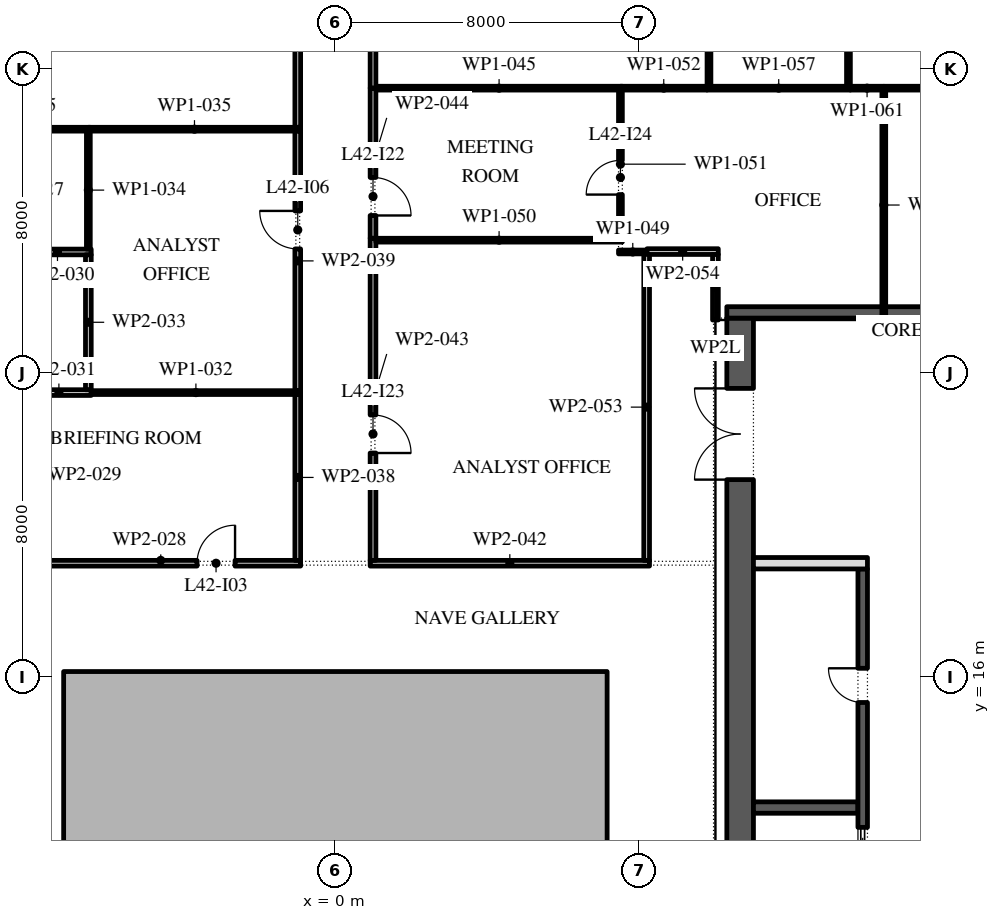
"""IFC4 building model, lengths in metres.
Left out: names, types, materials, properties, quantities, classifications, styles, units other than length and angle.
Written with IfcOpenShell. Run it as: python <this file> out.ifc"""

import sys

from ifc_helpers import new_model, si_unit, direction, frame, frame_2d, origin, place, context, subcontext, project, spatial, polyline, rectangle, outline, extrude, element, fill, save


model = new_model("IFC4")
c1 = context("Model", 3, precision=1e-05, world=origin(), true_north=direction((0.0, 1.0)))
c2 = subcontext(c1, "Body", "Model", "MODEL_VIEW")
j1 = project(units=[si_unit("LENGTHUNIT", "METRE"), si_unit("PLANEANGLEUNIT", "RADIAN")], contexts=[c1])
p1 = place(None, origin())
s1 = spatial("IfcSite", under=j1, at=p1, CompositionType="ELEMENT")
p2 = place(p1, origin())
s2 = spatial("IfcBuilding", under=s1, at=p2, CompositionType="ELEMENT")
p3 = place(p2, frame((0.0, 0.0, 192.6)))
s3 = spatial("IfcBuildingStorey", under=s2, at=p3, CompositionType="ELEMENT", Elevation=192.6)
p4 = place(p3, origin())
e1 = element("IfcWall", 1, at=p4, inside=s3, PredefinedType="STANDARD", context=c2, shape_type="SweptSolid", body=[
    extrude(outline(polyline([(-7.15, -2.15), (7.15, -2.15), (7.15, 16.15), (-7.15, 16.15), (-7.15, -2.15)]), holes=[polyline([(-7.0, -2.0), (-7.0, 16.0), (7.0, 16.0), (7.0, -2.0), (-7.0, -2.0)])]), origin(), (0.0, 0.0, 1.0), 4.0),
])
p5 = place(p3, frame((10.65, -2.45, 0.0), z_axis=(0.0, 0.0, 1.0), x_axis=(0.0, 1.0, 0.0)))
e2 = element("IfcWall", 2, at=p5, inside=s3, PredefinedType="SHEAR", context=c2, shape_type="SweptSolid", body=[
    extrude(rectangle(XDim=27.9, YDim=0.7, at=frame_2d((13.95, 0.0))), origin(), (0.0, 0.0, 1.0), 4.0),
])
p6 = place(p5, frame((23.65, 0.0, 0.0)))
e3 = element("IfcOpeningElement", 3, at=p6, cuts=e2, PredefinedType="OPENING", context=c2, shape_type="SweptSolid", body=[
    extrude(rectangle(XDim=2.4, YDim=2.1, at=frame_2d((1.2, 1.05))), frame((0.0, 0.36, 0.0), z_axis=(0.0, -1.0, 0.0), x_axis=(1.0, 0.0, 0.0)), (0.0, 0.0, 1.0), 0.72),
])
p7 = place(p5, frame((1.087, 0.0, 0.0)))
e4 = element("IfcOpeningElement", 4, at=p7, cuts=e2, PredefinedType="OPENING", context=c2, shape_type="SweptSolid", body=[
    extrude(rectangle(XDim=0.9, YDim=2.1, at=frame_2d((0.45, 1.05))), frame((0.0, 0.36, 0.0), z_axis=(0.0, -1.0, 0.0), x_axis=(1.0, 0.0, 0.0)), (0.0, 0.0, 1.0), 0.72),
])
p8 = place(p5, frame((4.262, 0.0, 0.0)))
e5 = element("IfcOpeningElement", 5, at=p8, cuts=e2, PredefinedType="OPENING", context=c2, shape_type="SweptSolid", body=[
    extrude(rectangle(XDim=1.0, YDim=2.1, at=frame_2d((0.5, 1.05))), frame((0.0, 0.36, 0.0), z_axis=(0.0, -1.0, 0.0), x_axis=(1.0, 0.0, 0.0)), (0.0, 0.0, 1.0), 0.72),
])
p9 = place(p3, frame((10.3, 25.6, 0.0), z_axis=(0.0, 0.0, 1.0), x_axis=(1.0, 0.0, 0.0)))
e6 = element("IfcWall", 6, at=p9, inside=s3, PredefinedType="SHEAR", context=c2, shape_type="SweptSolid", body=[
    extrude(rectangle(XDim=11.4, YDim=0.3, at=frame_2d((5.7, 0.0))), origin(), (0.0, 0.0, 1.0), 4.0),
])
p10 = place(p3, frame((11.0, 12.571, 0.0), z_axis=(0.0, 0.0, 1.0), x_axis=(1.0, 0.0, 0.0)))
e7 = element("IfcWall", 7, at=p10, inside=s3, PredefinedType="SHEAR", context=c2, shape_type="SweptSolid", body=[
    extrude(rectangle(XDim=2.75, YDim=0.3, at=frame_2d((1.375, 0.0))), origin(), (0.0, 0.0, 1.0), 4.0),
])
p11 = place(p3, frame((13.875, -2.45, 0.0), z_axis=(0.0, 0.0, 1.0), x_axis=(0.0, 1.0, 0.0)))
e8 = element("IfcWall", 8, at=p11, inside=s3, PredefinedType="SHEAR", context=c2, shape_type="SweptSolid", body=[
    extrude(rectangle(XDim=21.3, YDim=0.25, at=frame_2d((10.65, 0.0))), origin(), (0.0, 0.0, 1.0), 4.0),
])
p12 = place(p11, frame((17.786, 0.0, 0.0)))
e9 = element("IfcOpeningElement", 9, at=p12, cuts=e8, PredefinedType="OPENING", context=c2, shape_type="SweptSolid", body=[
    extrude(rectangle(XDim=0.9, YDim=2.1, at=frame_2d((0.45, 1.05))), frame((0.0, 0.135, 0.0), z_axis=(0.0, -1.0, 0.0), x_axis=(1.0, 0.0, 0.0)), (0.0, 0.0, 1.0), 0.27),
])
p13 = place(p11, frame((6.971, 0.0, 0.0)))
e10 = element("IfcOpeningElement", 10, at=p13, cuts=e8, PredefinedType="OPENING", context=c2, shape_type="SweptSolid", body=[
    extrude(rectangle(XDim=1.1, YDim=2.1, at=frame_2d((0.55, 1.05))), frame((0.0, 0.135, 0.0), z_axis=(0.0, -1.0, 0.0), x_axis=(1.0, 0.0, 0.0)), (0.0, 0.0, 1.0), 0.27),
])
p14 = place(p11, frame((9.114, 0.0, 0.0)))
e11 = element("IfcOpeningElement", 11, at=p14, cuts=e8, PredefinedType="OPENING", context=c2, shape_type="SweptSolid", body=[
    extrude(rectangle(XDim=1.1, YDim=2.1, at=frame_2d((0.55, 1.05))), frame((0.0, 0.135, 0.0), z_axis=(0.0, -1.0, 0.0), x_axis=(1.0, 0.0, 0.0)), (0.0, 0.0, 1.0), 0.27),
])
p15 = place(p11, frame((11.257, 0.0, 0.0)))
e12 = element("IfcOpeningElement", 12, at=p15, cuts=e8, PredefinedType="OPENING", context=c2, shape_type="SweptSolid", body=[
    extrude(rectangle(XDim=1.1, YDim=2.1, at=frame_2d((0.55, 1.05))), frame((0.0, 0.135, 0.0), z_axis=(0.0, -1.0, 0.0), x_axis=(1.0, 0.0, 0.0)), (0.0, 0.0, 1.0), 0.27),
])
p16 = place(p11, frame((13.4, 0.0, 0.0)))
e13 = element("IfcOpeningElement", 13, at=p16, cuts=e8, PredefinedType="OPENING", context=c2, shape_type="SweptSolid", body=[
    extrude(rectangle(XDim=1.1, YDim=2.1, at=frame_2d((0.55, 1.05))), frame((0.0, 0.135, 0.0), z_axis=(0.0, -1.0, 0.0), x_axis=(1.0, 0.0, 0.0)), (0.0, 0.0, 1.0), 0.27),
])
p17 = place(p3, frame((11.0, 19.0, 0.0), z_axis=(0.0, 0.0, 1.0), x_axis=(1.0, 0.0, 0.0)))
e14 = element("IfcWall", 14, at=p17, inside=s3, PredefinedType="PARTITIONING", context=c2, shape_type="SweptSolid", body=[
    extrude(rectangle(XDim=3.0, YDim=0.3, at=frame_2d((1.5, 0.0))), origin(), (0.0, 0.0, 1.0), 4.0),
])
p18 = place(p3, frame((-9.78, 30.42, 0.0), z_axis=(0.0, 0.0, 1.0), x_axis=(1.0, 0.0, 0.0)))
e15 = element("IfcWall", 15, at=p18, inside=s3, PredefinedType="PARTITIONING", context=c2, shape_type="SweptSolid", body=[
    extrude(rectangle(XDim=3.33, YDim=0.1, at=frame_2d((1.665, 0.0))), origin(), (0.0, 0.0, 1.0), 4.0),
])
p19 = place(p18, frame((1.15, 0.0, 0.0)))
e16 = element("IfcOpeningElement", 16, at=p19, cuts=e15, PredefinedType="OPENING", context=c2, shape_type="SweptSolid", body=[
    extrude(rectangle(XDim=0.9, YDim=2.1, at=frame_2d((0.45, 1.05))), frame((0.0, 0.06, 0.0), z_axis=(0.0, -1.0, 0.0), x_axis=(1.0, 0.0, 0.0)), (0.0, 0.0, 1.0), 0.12),
])
p20 = place(p3, frame((-8.275, 19.0, 0.0), z_axis=(0.0, 0.0, 1.0), x_axis=(1.0, 0.0, 0.0)))
e17 = element("IfcWall", 17, at=p20, inside=s3, PredefinedType="PARTITIONING", context=c2, shape_type="SweptSolid", body=[
    extrude(rectangle(XDim=7.36, YDim=0.15, at=frame_2d((3.68, 0.0))), origin(), (0.0, 0.0, 1.0), 4.0),
])
p21 = place(p20, frame((4.635, 0.0, 0.0)))
e18 = element("IfcOpeningElement", 18, at=p21, cuts=e17, PredefinedType="OPENING", context=c2, shape_type="SweptSolid", body=[
    extrude(rectangle(XDim=1.0, YDim=2.1, at=frame_2d((0.5, 1.05))), frame((0.0, 0.085, 0.0), z_axis=(0.0, -1.0, 0.0), x_axis=(1.0, 0.0, 0.0)), (0.0, 0.0, 1.0), 0.17),
])
p22 = place(p3, frame((-8.2, 27.19, 0.0), z_axis=(0.0, 0.0, 1.0), x_axis=(1.0, 0.0, 0.0)))
e19 = element("IfcWall", 19, at=p22, inside=s3, PredefinedType="PARTITIONING", context=c2, shape_type="SweptSolid", body=[
    extrude(rectangle(XDim=1.775, YDim=0.15, at=frame_2d((0.887, 0.0))), origin(), (0.0, 0.0, 1.0), 4.0),
])
p23 = place(p3, frame((-6.425, 23.49, 0.0), z_axis=(0.0, 0.0, 1.0), x_axis=(-1.0, 0.0, 0.0)))
e20 = element("IfcWall", 20, at=p23, inside=s3, PredefinedType="PARTITIONING", context=c2, shape_type="SweptSolid", body=[
    extrude(rectangle(XDim=1.7, YDim=0.15, at=frame_2d((0.85, 0.0))), origin(), (0.0, 0.0, 1.0), 4.0),
])
p24 = place(p3, frame((-6.425, 23.49, 0.0), z_axis=(0.0, 0.0, 1.0), x_axis=(1.0, 0.0, 0.0)))
e21 = element("IfcWall", 21, at=p24, inside=s3, PredefinedType="PARTITIONING", context=c2, shape_type="SweptSolid", body=[
    extrude(rectangle(XDim=5.51, YDim=0.1, at=frame_2d((2.755, 0.0))), origin(), (0.0, 0.0, 1.0), 4.0),
])
p25 = place(p3, frame((-6.5, 27.115, 0.0), z_axis=(0.0, 0.0, 1.0), x_axis=(0.0, -1.0, 0.0)))
e22 = element("IfcWall", 22, at=p25, inside=s3, PredefinedType="PARTITIONING", context=c2, shape_type="SweptSolid", body=[
    extrude(rectangle(XDim=3.55, YDim=0.15, at=frame_2d((1.775, 0.0))), origin(), (0.0, 0.0, 1.0), 4.0),
])
p26 = place(p3, frame((-6.5, 30.37, 0.0), z_axis=(0.0, 0.0, 1.0), x_axis=(0.0, -1.0, 0.0)))
e23 = element("IfcWall", 23, at=p26, inside=s3, PredefinedType="PARTITIONING", context=c2, shape_type="SweptSolid", body=[
    extrude(rectangle(XDim=3.105, YDim=0.1, at=frame_2d((1.553, 0.0))), origin(), (0.0, 0.0, 1.0), 4.0),
])
p27 = place(p3, frame((-6.5, 30.42, 0.0), z_axis=(0.0, 0.0, 1.0), x_axis=(1.0, 0.0, 0.0)))
e24 = element("IfcWall", 24, at=p27, inside=s3, PredefinedType="PARTITIONING", context=c2, shape_type="SweptSolid", body=[
    extrude(rectangle(XDim=5.585, YDim=0.1, at=frame_2d((2.792, 0.0))), origin(), (0.0, 0.0, 1.0), 4.0),
])
p28 = place(p3, frame((-0.99, 19.075, 0.0), z_axis=(0.0, 0.0, 1.0), x_axis=(0.0, 1.0, 0.0)))
e25 = element("IfcWall", 25, at=p28, inside=s3, PredefinedType="PARTITIONING", context=c2, shape_type="SweptSolid", body=[
    extrude(rectangle(XDim=4.365, YDim=0.15, at=frame_2d((2.183, 0.0))), origin(), (0.0, 0.0, 1.0), 4.0),
])
p29 = place(p3, frame((-0.99, 23.54, 0.0), z_axis=(0.0, 0.0, 1.0), x_axis=(0.0, 1.0, 0.0)))
e26 = element("IfcWall", 26, at=p29, inside=s3, PredefinedType="PARTITIONING", context=c2, shape_type="SweptSolid", body=[
    extrude(rectangle(XDim=6.83, YDim=0.15, at=frame_2d((3.415, 0.0))), origin(), (0.0, 0.0, 1.0), 4.0),
])
p30 = place(p29, frame((3.73, 0.0, 0.0)))
e27 = element("IfcOpeningElement", 27, at=p30, cuts=e26, PredefinedType="OPENING", context=c2, shape_type="SweptSolid", body=[
    extrude(rectangle(XDim=1.0, YDim=2.1, at=frame_2d((0.5, 1.05))), frame((0.0, 0.085, 0.0), z_axis=(0.0, -1.0, 0.0), x_axis=(1.0, 0.0, 0.0)), (0.0, 0.0, 1.0), 0.17),
])
p31 = place(p3, frame((-0.99, 30.47, 0.0), z_axis=(0.0, 0.0, 1.0), x_axis=(0.0, 1.0, 0.0)))
e28 = element("IfcWall", 28, at=p31, inside=s3, PredefinedType="PARTITIONING", context=c2, shape_type="SweptSolid", body=[
    extrude(rectangle(XDim=10.826, YDim=0.15, at=frame_2d((5.413, 0.0))), origin(), (0.0, 0.0, 1.0), 4.0),
])
p32 = place(p31, frame((3.9, 0.0, 0.0)))
e29 = element("IfcOpeningElement", 29, at=p32, cuts=e28, PredefinedType="OPENING", context=c2, shape_type="SweptSolid", body=[
    extrude(rectangle(XDim=1.0, YDim=2.1, at=frame_2d((0.5, 1.05))), frame((0.0, 0.085, 0.0), z_axis=(0.0, -1.0, 0.0), x_axis=(1.0, 0.0, 0.0)), (0.0, 0.0, 1.0), 0.17),
])
p33 = place(p3, frame((0.915, 19.0, 0.0), z_axis=(0.0, 0.0, 1.0), x_axis=(1.0, 0.0, 0.0)))
e30 = element("IfcWall", 30, at=p33, inside=s3, PredefinedType="PARTITIONING", context=c2, shape_type="SweptSolid", body=[
    extrude(rectangle(XDim=7.35, YDim=0.15, at=frame_2d((3.675, 0.0))), origin(), (0.0, 0.0, 1.0), 4.0),
])
p34 = place(p3, frame((0.99, 27.55, 0.0), z_axis=(0.0, 0.0, 1.0), x_axis=(0.0, -1.0, 0.0)))
e31 = element("IfcWall", 31, at=p34, inside=s3, PredefinedType="PARTITIONING", context=c2, shape_type="SweptSolid", body=[
    extrude(rectangle(XDim=8.475, YDim=0.15, at=frame_2d((4.238, 0.0))), origin(), (0.0, 0.0, 1.0), 4.0),
])
p35 = place(p34, frame((4.65, 0.0, 0.0)))
e32 = element("IfcOpeningElement", 32, at=p35, cuts=e31, PredefinedType="OPENING", context=c2, shape_type="SweptSolid", body=[
    extrude(rectangle(XDim=1.0, YDim=2.1, at=frame_2d((0.5, 1.05))), frame((0.0, 0.085, 0.0), z_axis=(0.0, -1.0, 0.0), x_axis=(1.0, 0.0, 0.0)), (0.0, 0.0, 1.0), 0.17),
])
p36 = place(p3, frame((0.99, 31.5, 0.0), z_axis=(0.0, 0.0, 1.0), x_axis=(0.0, -1.0, 0.0)))
e33 = element("IfcWall", 33, at=p36, inside=s3, PredefinedType="PARTITIONING", context=c2, shape_type="SweptSolid", body=[
    extrude(rectangle(XDim=3.95, YDim=0.15, at=frame_2d((1.975, 0.0))), origin(), (0.0, 0.0, 1.0), 4.0),
])
p37 = place(p36, frame((2.35, 0.0, 0.0)))
e34 = element("IfcOpeningElement", 34, at=p37, cuts=e33, PredefinedType="OPENING", context=c2, shape_type="SweptSolid", body=[
    extrude(rectangle(XDim=1.0, YDim=2.1, at=frame_2d((0.5, 1.05))), frame((0.0, 0.085, 0.0), z_axis=(0.0, -1.0, 0.0), x_axis=(1.0, 0.0, 0.0)), (0.0, 0.0, 1.0), 0.17),
])
p38 = place(p3, frame((1.065, 31.5, 0.0), z_axis=(0.0, 0.0, 1.0), x_axis=(1.0, 0.0, 0.0)))
e35 = element("IfcWall", 35, at=p38, inside=s3, PredefinedType="PARTITIONING", context=c2, shape_type="SweptSolid", body=[
    extrude(rectangle(XDim=6.485, YDim=0.1, at=frame_2d((3.243, 0.0))), origin(), (0.0, 0.0, 1.0), 4.0),
])
p39 = place(p3, frame((0.99, 40.05, 0.0), z_axis=(0.0, 0.0, 1.0), x_axis=(0.0, -1.0, 0.0)))
e36 = element("IfcWall", 36, at=p39, inside=s3, PredefinedType="PARTITIONING", context=c2, shape_type="SweptSolid", body=[
    extrude(rectangle(XDim=8.55, YDim=0.15, at=frame_2d((4.275, 0.0))), origin(), (0.0, 0.0, 1.0), 4.0),
])
p40 = place(p39, frame((2.9, 0.0, 0.0)))
e37 = element("IfcOpeningElement", 37, at=p40, cuts=e36, PredefinedType="OPENING", context=c2, shape_type="SweptSolid", body=[
    extrude(rectangle(XDim=1.0, YDim=2.1, at=frame_2d((0.5, 1.05))), frame((0.0, 0.085, 0.0), z_axis=(0.0, -1.0, 0.0), x_axis=(1.0, 0.0, 0.0)), (0.0, 0.0, 1.0), 0.17),
])
p41 = place(p3, frame((7.45, 27.19, 0.0), z_axis=(0.0, 0.0, 1.0), x_axis=(1.0, 0.0, 0.0)))
e38 = element("IfcWall", 38, at=p41, inside=s3, PredefinedType="PARTITIONING", context=c2, shape_type="SweptSolid", body=[
    extrude(rectangle(XDim=0.75, YDim=0.1, at=frame_2d((0.375, 0.0))), origin(), (0.0, 0.0, 1.0), 4.0),
])
p42 = place(p3, frame((7.55, 27.5, 0.0), z_axis=(0.0, 0.0, 1.0), x_axis=(-1.0, 0.0, 0.0)))
e39 = element("IfcWall", 39, at=p42, inside=s3, PredefinedType="PARTITIONING", context=c2, shape_type="SweptSolid", body=[
    extrude(rectangle(XDim=6.485, YDim=0.1, at=frame_2d((3.243, 0.0))), origin(), (0.0, 0.0, 1.0), 4.0),
])
p43 = place(p3, frame((7.5, 31.45, 0.0), z_axis=(0.0, 0.0, 1.0), x_axis=(0.0, -1.0, 0.0)))
e40 = element("IfcWall", 40, at=p43, inside=s3, PredefinedType="PARTITIONING", context=c2, shape_type="SweptSolid", body=[
    extrude(rectangle(XDim=3.9, YDim=0.1, at=frame_2d((1.95, 0.0))), origin(), (0.0, 0.0, 1.0), 4.0),
])
p44 = place(p43, frame((1.85, 0.0, 0.0)))
e41 = element("IfcOpeningElement", 41, at=p44, cuts=e40, PredefinedType="OPENING", context=c2, shape_type="SweptSolid", body=[
    extrude(rectangle(XDim=0.9, YDim=2.1, at=frame_2d((0.45, 1.05))), frame((0.0, 0.06, 0.0), z_axis=(0.0, -1.0, 0.0), x_axis=(1.0, 0.0, 0.0)), (0.0, 0.0, 1.0), 0.12),
])
p45 = place(p3, frame((7.5, 31.5, 0.0), z_axis=(0.0, 0.0, 1.0), x_axis=(1.0, 0.0, 0.0)))
e42 = element("IfcWall", 42, at=p45, inside=s3, PredefinedType="PARTITIONING", context=c2, shape_type="SweptSolid", body=[
    extrude(rectangle(XDim=2.28, YDim=0.1, at=frame_2d((1.14, 0.0))), origin(), (0.0, 0.0, 1.0), 4.0),
])
p46 = place(p3, frame((8.19, 19.075, 0.0), z_axis=(0.0, 0.0, 1.0), x_axis=(0.0, 1.0, 0.0)))
e43 = element("IfcWall", 43, at=p46, inside=s3, PredefinedType="PARTITIONING", context=c2, shape_type="SweptSolid", body=[
    extrude(rectangle(XDim=8.065, YDim=0.15, at=frame_2d((4.032, 0.0))), origin(), (0.0, 0.0, 1.0), 4.0),
])
p47 = place(p3, frame((8.2, 27.2, 0.0), z_axis=(0.0, 0.0, 1.0), x_axis=(1.0, 0.0, 0.0)))
e44 = element("IfcWall", 44, at=p47, inside=s3, PredefinedType="PARTITIONING", context=c2, shape_type="SweptSolid", body=[
    extrude(rectangle(XDim=1.875, YDim=0.15, at=frame_2d((0.938, 0.0))), origin(), (0.0, 0.0, 1.0), 4.0),
])
p48 = place(p3, frame((9.78, 31.5, 0.0), z_axis=(0.0, 0.0, 1.0), x_axis=(1.0, 0.0, 0.0)))
e45 = element("IfcWall", 45, at=p48, inside=s3, PredefinedType="PARTITIONING", context=c2, shape_type="SweptSolid", body=[
    extrude(rectangle(XDim=3.77, YDim=0.1, at=frame_2d((1.885, 0.0))), origin(), (0.0, 0.0, 1.0), 4.0),
])
p49 = place(p3, frame((9.83, 39.95, 0.0), z_axis=(0.0, 0.0, 1.0), x_axis=(0.0, -1.0, 0.0)))
e46 = element("IfcWall", 46, at=p49, inside=s3, PredefinedType="PARTITIONING", context=c2, shape_type="SweptSolid", body=[
    extrude(rectangle(XDim=8.4, YDim=0.1, at=frame_2d((4.2, 0.0))), origin(), (0.0, 0.0, 1.0), 4.0),
])
p50 = place(p49, frame((4.6, 0.0, 0.0)))
e47 = element("IfcOpeningElement", 47, at=p50, cuts=e46, PredefinedType="OPENING", context=c2, shape_type="SweptSolid", body=[
    extrude(rectangle(XDim=0.9, YDim=2.1, at=frame_2d((0.45, 1.05))), frame((0.0, 0.06, 0.0), z_axis=(0.0, -1.0, 0.0), x_axis=(1.0, 0.0, 0.0)), (0.0, 0.0, 1.0), 0.12),
])
p51 = place(p3, frame((10.0, 27.125, 0.0), z_axis=(0.0, 0.0, 1.0), x_axis=(0.0, -1.0, 0.0)))
e48 = element("IfcWall", 48, at=p51, inside=s3, PredefinedType="PARTITIONING", context=c2, shape_type="SweptSolid", body=[
    extrude(rectangle(XDim=1.725, YDim=0.15, at=frame_2d((0.863, 0.0))), origin(), (0.0, 0.0, 1.0), 3.02),
])
p52 = place(p3, frame((13.55, 31.5, 0.0), z_axis=(0.0, 0.0, 1.0), x_axis=(1.0, 0.0, 0.0)))
e49 = element("IfcWall", 49, at=p52, inside=s3, PredefinedType="PARTITIONING", context=c2, shape_type="SweptSolid", body=[
    extrude(rectangle(XDim=0.88, YDim=0.1, at=frame_2d((0.44, 0.0))), origin(), (0.0, 0.0, 1.0), 4.0),
])
p53 = place(p3, frame((13.5, 39.95, 0.0), z_axis=(0.0, 0.0, 1.0), x_axis=(0.0, -1.0, 0.0)))
e50 = element("IfcWall", 50, at=p53, inside=s3, PredefinedType="PARTITIONING", context=c2, shape_type="SweptSolid", body=[
    extrude(rectangle(XDim=8.4, YDim=0.1, at=frame_2d((4.2, 0.0))), origin(), (0.0, 0.0, 1.0), 4.0),
])
p54 = place(p3, frame((14.43, 31.45, 0.0), z_axis=(0.0, 0.0, 1.0), x_axis=(0.0, -1.0, 0.0)))
e51 = element("IfcWall", 51, at=p54, inside=s3, PredefinedType="PARTITIONING", context=c2, shape_type="SweptSolid", body=[
    extrude(rectangle(XDim=6.05, YDim=0.1, at=frame_2d((3.025, 0.0))), origin(), (0.0, 0.0, 1.0), 4.0),
])
p55 = place(p3, frame((14.43, 31.5, 0.0), z_axis=(0.0, 0.0, 1.0), x_axis=(1.0, 0.0, 0.0)))
e52 = element("IfcWall", 52, at=p55, inside=s3, PredefinedType="PARTITIONING", context=c2, shape_type="SweptSolid", body=[
    extrude(rectangle(XDim=8.14, YDim=0.1, at=frame_2d((4.07, 0.0))), origin(), (0.0, 0.0, 1.0), 4.0),
])
p56 = place(p12, origin())
e53 = element("IfcDoor", 53, at=p56, inside=s3, OperationType="SINGLE_SWING_LEFT", PredefinedType="DOOR", context=c2, shape_type="SweptSolid", body=[
    extrude(rectangle(XDim=0.9, YDim=2.1, at=frame_2d((0.45, 1.05))), frame((0.0, 0.125, 0.0), z_axis=(0.0, -1.0, 0.0), x_axis=(1.0, 0.0, 0.0)), (0.0, 0.0, 1.0), 0.05),
])
fill(e9, e53)
p57 = place(p16, origin())
e54 = element("IfcDoor", 54, at=p57, inside=s3, OperationType="SLIDING_TO_LEFT", PredefinedType="DOOR", context=c2, shape_type="SweptSolid", body=[
    extrude(rectangle(XDim=1.1, YDim=2.1, at=frame_2d((0.55, 1.05))), frame((0.0, 0.025, 0.0), z_axis=(0.0, -1.0, 0.0), x_axis=(1.0, 0.0, 0.0)), (0.0, 0.0, 1.0), 0.05),
])
fill(e13, e54)
p58 = place(p6, origin())
e55 = element("IfcDoor", 55, at=p58, inside=s3, OperationType="DOUBLE_DOOR_SINGLE_SWING", PredefinedType="DOOR", context=c2, shape_type="SweptSolid", body=[
    extrude(rectangle(XDim=2.4, YDim=2.1, at=frame_2d((1.2, 1.05))), frame((0.0, 0.025, 0.0), z_axis=(0.0, -1.0, 0.0), x_axis=(1.0, 0.0, 0.0)), (0.0, 0.0, 1.0), 0.05),
])
fill(e3, e55)
p59 = place(p21, origin())
e56 = element("IfcDoor", 56, at=p59, inside=s3, OperationType="SINGLE_SWING_LEFT", PredefinedType="DOOR", context=c2, shape_type="SweptSolid", body=[
    extrude(rectangle(XDim=1.0, YDim=2.1, at=frame_2d((0.5, 1.05))), frame((0.0, 0.025, 0.0), z_axis=(0.0, -1.0, 0.0), x_axis=(1.0, 0.0, 0.0)), (0.0, 0.0, 1.0), 0.05),
])
fill(e18, e56)
p60 = place(p30, origin())
e57 = element("IfcDoor", 57, at=p60, inside=s3, OperationType="SINGLE_SWING_LEFT", PredefinedType="DOOR", context=c2, shape_type="SweptSolid", body=[
    extrude(rectangle(XDim=1.0, YDim=2.1, at=frame_2d((0.5, 1.05))), frame((0.0, 0.025, 0.0), z_axis=(0.0, -1.0, 0.0), x_axis=(1.0, 0.0, 0.0)), (0.0, 0.0, 1.0), 0.05),
])
fill(e27, e57)
p61 = place(p37, origin())
e58 = element("IfcDoor", 58, at=p61, inside=s3, OperationType="SINGLE_SWING_LEFT", PredefinedType="DOOR", context=c2, shape_type="SweptSolid", body=[
    extrude(rectangle(XDim=1.0, YDim=2.1, at=frame_2d((0.5, 1.05))), frame((0.0, 0.025, 0.0), z_axis=(0.0, -1.0, 0.0), x_axis=(1.0, 0.0, 0.0)), (0.0, 0.0, 1.0), 0.05),
])
fill(e34, e58)
p62 = place(p35, origin())
e59 = element("IfcDoor", 59, at=p62, inside=s3, OperationType="SINGLE_SWING_LEFT", PredefinedType="DOOR", context=c2, shape_type="SweptSolid", body=[
    extrude(rectangle(XDim=1.0, YDim=2.1, at=frame_2d((0.5, 1.05))), frame((0.0, 0.025, 0.0), z_axis=(0.0, -1.0, 0.0), x_axis=(1.0, 0.0, 0.0)), (0.0, 0.0, 1.0), 0.05),
])
fill(e32, e59)
p63 = place(p44, frame((0.9, 0.0, 0.0), z_axis=(0.0, 0.0, 1.0), x_axis=(-1.0, 0.0, 0.0)))
e60 = element("IfcDoor", 60, at=p63, inside=s3, OperationType="SINGLE_SWING_RIGHT", PredefinedType="DOOR", context=c2, shape_type="SweptSolid", body=[
    extrude(rectangle(XDim=0.9, YDim=2.1, at=frame_2d((0.45, 1.05))), frame((0.0, 0.025, 0.0), z_axis=(0.0, -1.0, 0.0), x_axis=(1.0, 0.0, 0.0)), (0.0, 0.0, 1.0), 0.05),
])
fill(e41, e60)
save(model, sys.argv[1])
